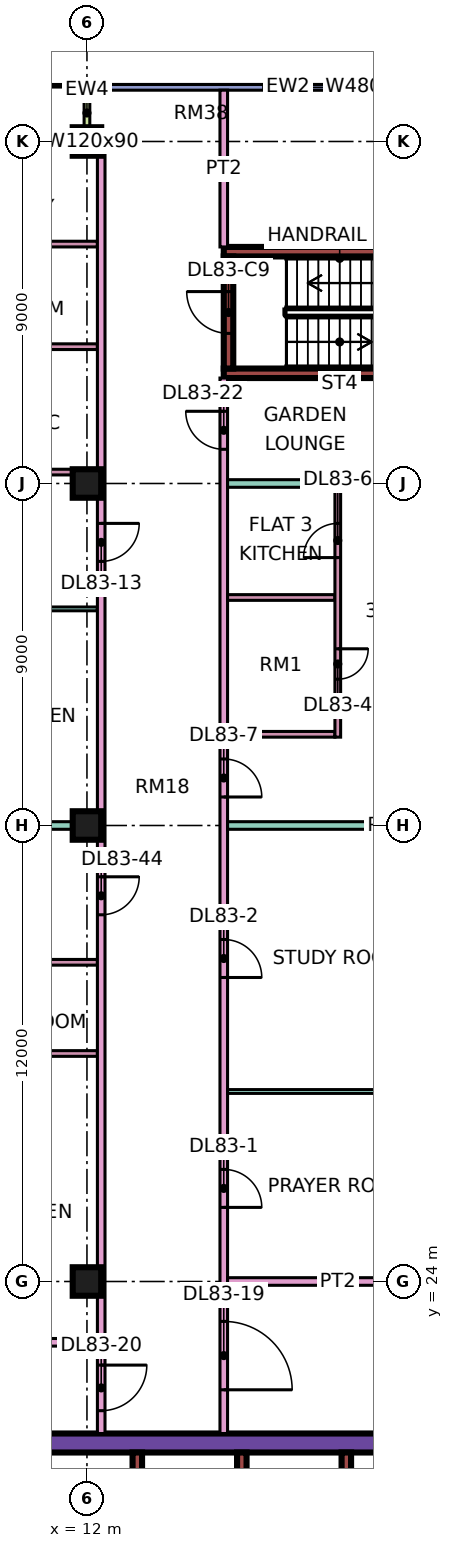
"""IFC4 building model, lengths in metres.
Left out: names, types, materials, properties, quantities, classifications, styles, units other than length and angle.
Written with IfcOpenShell. Run it as: python <this file> out.ifc"""

import sys

from ifc_helpers import new_model, si_unit, direction, frame, frame_2d, origin, origin_2d, place, context, subcontext, project, spatial, rectangle, extrude, element, fill, save


model = new_model("IFC4")
c1 = context("Model", 3, precision=1e-05, world=origin(), true_north=direction((0.0, 1.0)))
c2 = subcontext(c1, "Body", "Model", "MODEL_VIEW")
j1 = project(units=[si_unit("LENGTHUNIT", "METRE"), si_unit("PLANEANGLEUNIT", "RADIAN")], contexts=[c1])
p1 = place(None, origin())
s1 = spatial("IfcSite", under=j1, at=p1, CompositionType="ELEMENT")
p2 = place(p1, origin())
s2 = spatial("IfcBuilding", under=s1, at=p2, CompositionType="ELEMENT")
p3 = place(p2, frame((0.0, 0.0, 357.65)))
s3 = spatial("IfcBuildingStorey", under=s2, at=p3, CompositionType="ELEMENT", Elevation=357.65)
for number, where, z_axis, x_axis in (
    (1, (12.0, 24.0, 0.0), (0.0, 0.0, 1.0), (1.0, 0.0, 0.0)),
    (2, (12.0, 36.0, 0.0), (0.0, 0.0, 1.0), (1.0, 0.0, 0.0)),
    (3, (12.0, 45.0, 0.0), (0.0, 0.0, 1.0), (1.0, 0.0, 0.0)),
    (4, (12.0, 54.0, 0.0), (0.0, 0.0, 1.0), (1.0, 0.0, 0.0)),
):
    element("IfcColumn", number, at=place(p3, frame(where, z_axis=z_axis, x_axis=x_axis)), inside=s3, PredefinedType="COLUMN", context=c2, shape_type="SweptSolid", body=[
        extrude(rectangle(XDim=0.75, YDim=0.75, at=origin_2d()), origin(), (0.0, 0.0, 1.0), 3.75),
    ])
p4 = place(p3, frame((9.0, 19.75, 0.0), z_axis=(0.0, 0.0, 1.0), x_axis=(1.0, 0.0, 0.0)))
e5 = element("IfcWall", 5, at=p4, inside=s3, PredefinedType="SHEAR", context=c2, shape_type="SweptSolid", body=[
    extrude(rectangle(XDim=25.0, YDim=0.5, at=frame_2d((12.5, 0.0))), origin(), (0.0, 0.0, 1.0), 3.75),
])
p5 = place(p4, frame((19.1, 0.0, 0.0)))
e6 = element("IfcOpeningElement", 6, at=p5, cuts=e5, PredefinedType="OPENING", context=c2, shape_type="SweptSolid", body=[
    extrude(rectangle(XDim=1.8, YDim=2.4, at=frame_2d((0.9, 1.2))), frame((0.0, 0.26, 0.0), z_axis=(0.0, -1.0, 0.0), x_axis=(1.0, 0.0, 0.0)), (0.0, 0.0, 1.0), 0.52),
])
p6 = place(p3, frame((13.325, 7.5, 0.0), z_axis=(0.0, 0.0, 1.0), x_axis=(0.0, 1.0, 0.0)))
e7 = element("IfcWall", 7, at=p6, inside=s3, PredefinedType="SHEAR", context=c2, shape_type="SweptSolid", body=[
    extrude(rectangle(XDim=12.0, YDim=0.25, at=frame_2d((6.0, 0.0))), origin(), (0.0, 0.0, 1.0), 3.75),
])
for number, where, z_axis, x_axis in (
    (8, (16.075, 15.8, 0.0), (0.0, 0.0, 1.0), (0.0, 1.0, 0.0)),
    (9, (18.825, 15.8, 0.0), (0.0, 0.0, 1.0), (0.0, 1.0, 0.0)),
):
    element("IfcWall", number, at=place(p3, frame(where, z_axis=z_axis, x_axis=x_axis)), inside=s3, PredefinedType="SHEAR", context=c2, shape_type="SweptSolid", body=[
        extrude(rectangle(XDim=3.7, YDim=0.25, at=frame_2d((1.85, 0.0))), origin(), (0.0, 0.0, 1.0), 3.75),
    ])
for number, where, z_axis, x_axis in (
    (10, (15.6, 47.9, 0.0), (0.0, 0.0, 1.0), (1.0, 0.0, 0.0)),
    (11, (15.6, 51.1, 0.0), (0.0, 0.0, 1.0), (1.0, 0.0, 0.0)),
):
    element("IfcWall", number, at=place(p3, frame(where, z_axis=z_axis, x_axis=x_axis)), inside=s3, PredefinedType="SHEAR", context=c2, shape_type="SweptSolid", body=[
        extrude(rectangle(XDim=7.0, YDim=0.25, at=frame_2d((3.5, 0.0))), origin(), (0.0, 0.0, 1.0), 3.75),
    ])
p7 = place(p3, frame((15.725, 48.025, 0.0), z_axis=(0.0, 0.0, 1.0), x_axis=(0.0, 1.0, 0.0)))
e12 = element("IfcWall", 12, at=p7, inside=s3, PredefinedType="SHEAR", context=c2, shape_type="SweptSolid", body=[
    extrude(rectangle(XDim=2.95, YDim=0.25, at=frame_2d((1.475, 0.0))), origin(), (0.0, 0.0, 1.0), 3.75),
])
p8 = place(p7, frame((0.925, 0.0, 0.0)))
e13 = element("IfcOpeningElement", 13, at=p8, cuts=e12, PredefinedType="OPENING", context=c2, shape_type="SweptSolid", body=[
    extrude(rectangle(XDim=1.1, YDim=2.2, at=frame_2d((0.55, 1.1))), frame((0.0, 0.135, 0.0), z_axis=(0.0, -1.0, 0.0), x_axis=(1.0, 0.0, 0.0)), (0.0, 0.0, 1.0), 0.27),
])
p9 = place(p3, frame((22.5, 55.425, 0.0), z_axis=(0.0, 0.0, 1.0), x_axis=(-1.0, 0.0, 0.0)))
e14 = element("IfcWall", 14, at=p9, inside=s3, PredefinedType="SOLIDWALL", context=c2, shape_type="SweptSolid", body=[
    extrude(rectangle(XDim=10.425, YDim=0.15, at=frame_2d((5.212, 0.0))), origin(), (0.0, 0.0, 1.0), 3.35),
])
p10 = place(p9, frame((1.05, 0.0, 0.45)))
e15 = element("IfcOpeningElement", 15, at=p10, cuts=e14, PredefinedType="OPENING", context=c2, shape_type="SweptSolid", body=[
    extrude(rectangle(XDim=4.8, YDim=2.4, at=frame_2d((2.4, 1.2))), frame((0.0, 0.085, 0.0), z_axis=(0.0, -1.0, 0.0), x_axis=(1.0, 0.0, 0.0)), (0.0, 0.0, 1.0), 0.17),
])
p11 = place(p3, frame((11.925, 54.0, 0.0), z_axis=(0.0, 0.0, 1.0), x_axis=(-1.0, 0.0, 0.0)))
e16 = element("IfcWall", 16, at=p11, inside=s3, PredefinedType="SOLIDWALL", context=c2, shape_type="SweptSolid", body=[
    extrude(rectangle(XDim=10.35, YDim=0.15, at=frame_2d((5.175, 0.0))), origin(), (0.0, 0.0, 1.0), 3.35),
])
p12 = place(p11, frame((2.075, 0.0, 1.7)))
e17 = element("IfcOpeningElement", 17, at=p12, cuts=e16, PredefinedType="OPENING", context=c2, shape_type="SweptSolid", body=[
    extrude(rectangle(XDim=1.2, YDim=0.9, at=frame_2d((0.6, 0.45))), frame((0.0, 0.085, 0.0), z_axis=(0.0, -1.0, 0.0), x_axis=(1.0, 0.0, 0.0)), (0.0, 0.0, 1.0), 0.17),
])
p13 = place(p11, frame((7.35, 0.0, 0.0)))
e18 = element("IfcOpeningElement", 18, at=p13, cuts=e16, PredefinedType="OPENING", context=c2, shape_type="SweptSolid", body=[
    extrude(rectangle(XDim=1.8, YDim=2.4, at=frame_2d((0.9, 1.2))), frame((0.0, 0.085, 0.0), z_axis=(0.0, -1.0, 0.0), x_axis=(1.0, 0.0, 0.0)), (0.0, 0.0, 1.0), 0.17),
])
p14 = place(p3, frame((12.0, 55.5, 0.0), z_axis=(0.0, 0.0, 1.0), x_axis=(0.0, -1.0, 0.0)))
e19 = element("IfcWall", 19, at=p14, inside=s3, PredefinedType="SOLIDWALL", context=c2, shape_type="SweptSolid", body=[
    extrude(rectangle(XDim=1.5, YDim=0.15, at=frame_2d((0.75, 0.0))), origin(), (0.0, 0.0, 1.0), 3.35),
])
p15 = place(p3, frame((-1.35, 22.4, 0.0), z_axis=(0.0, 0.0, 1.0), x_axis=(1.0, 0.0, 0.0)))
e20 = element("IfcWall", 20, at=p15, inside=s3, PredefinedType="PARTITIONING", context=c2, shape_type="SweptSolid", body=[
    extrude(rectangle(XDim=13.625, YDim=0.2, at=frame_2d((6.812, 0.0))), origin(), (0.0, 0.0, 1.0), 3.35),
])
p16 = place(p3, frame((0.0, 36.0, 0.0), z_axis=(0.0, 0.0, 1.0), x_axis=(1.0, 0.0, 0.0)))
e21 = element("IfcWall", 21, at=p16, inside=s3, PredefinedType="PARTITIONING", context=c2, shape_type="SweptSolid", body=[
    extrude(rectangle(XDim=12.275, YDim=0.2, at=frame_2d((6.137, 0.0))), origin(), (0.0, 0.0, 1.0), 3.35),
])
p17 = place(p3, frame((7.025, 41.7, 0.0), z_axis=(0.0, 0.0, 1.0), x_axis=(1.0, 0.0, 0.0)))
e22 = element("IfcWall", 22, at=p17, inside=s3, PredefinedType="PARTITIONING", context=c2, shape_type="SweptSolid", body=[
    extrude(rectangle(XDim=5.25, YDim=0.1, at=frame_2d((2.625, 0.0))), origin(), (0.0, 0.0, 1.0), 3.35),
])
p18 = place(p17, frame((2.2, 0.0, 0.0)))
e23 = element("IfcOpeningElement", 23, at=p18, cuts=e22, PredefinedType="OPENING", context=c2, shape_type="SweptSolid", body=[
    extrude(rectangle(XDim=0.9, YDim=2.1, at=frame_2d((0.45, 1.05))), frame((0.0, 0.06, 0.0), z_axis=(0.0, -1.0, 0.0), x_axis=(1.0, 0.0, 0.0)), (0.0, 0.0, 1.0), 0.12),
])
p19 = place(p3, frame((7.05, 45.3, 0.0), z_axis=(0.0, 0.0, 1.0), x_axis=(1.0, 0.0, 0.0)))
e24 = element("IfcWall", 24, at=p19, inside=s3, PredefinedType="PARTITIONING", context=c2, shape_type="SweptSolid", body=[
    extrude(rectangle(XDim=5.225, YDim=0.15, at=frame_2d((2.612, 0.0))), origin(), (0.0, 0.0, 1.0), 3.35),
])
p20 = place(p19, frame((2.275, 0.0, 0.0)))
e25 = element("IfcOpeningElement", 25, at=p20, cuts=e24, PredefinedType="OPENING", context=c2, shape_type="SweptSolid", body=[
    extrude(rectangle(XDim=0.8, YDim=2.1, at=frame_2d((0.4, 1.05))), frame((0.0, 0.085, 0.0), z_axis=(0.0, -1.0, 0.0), x_axis=(1.0, 0.0, 0.0)), (0.0, 0.0, 1.0), 0.17),
])
for number, where, z_axis, x_axis in (
    (26, (7.05, 48.6, 0.0), (0.0, 0.0, 1.0), (1.0, 0.0, 0.0)),
    (27, (7.05, 51.3, 0.0), (0.0, 0.0, 1.0), (1.0, 0.0, 0.0)),
):
    element("IfcWall", number, at=place(p3, frame(where, z_axis=z_axis, x_axis=x_axis)), inside=s3, PredefinedType="PARTITIONING", context=c2, shape_type="SweptSolid", body=[
        extrude(rectangle(XDim=5.225, YDim=0.15, at=frame_2d((2.612, 0.0))), origin(), (0.0, 0.0, 1.0), 3.35),
    ])
for number, where, z_axis, x_axis in (
    (28, (8.25, 30.0, 0.0), (0.0, 0.0, 1.0), (1.0, 0.0, 0.0)),
    (29, (8.25, 32.4, 0.0), (0.0, 0.0, 1.0), (1.0, 0.0, 0.0)),
):
    element("IfcWall", number, at=place(p3, frame(where, z_axis=z_axis, x_axis=x_axis)), inside=s3, PredefinedType="PARTITIONING", context=c2, shape_type="SweptSolid", body=[
        extrude(rectangle(XDim=4.025, YDim=0.15, at=frame_2d((2.012, 0.0))), origin(), (0.0, 0.0, 1.0), 3.35),
    ])
p21 = place(p3, frame((12.375, 20.0, 0.0), z_axis=(0.0, 0.0, 1.0), x_axis=(0.0, 1.0, 0.0)))
e30 = element("IfcWall", 30, at=p21, inside=s3, PredefinedType="PARTITIONING", context=c2, shape_type="SweptSolid", body=[
    extrude(rectangle(XDim=34.0, YDim=0.2, at=frame_2d((17.0, 0.0))), origin(), (0.0, 0.0, 1.0), 3.35),
])
p22 = place(p21, frame((22.95, 0.0, 0.0)))
e31 = element("IfcOpeningElement", 31, at=p22, cuts=e30, PredefinedType="OPENING", context=c2, shape_type="SweptSolid", body=[
    extrude(rectangle(XDim=1.0, YDim=2.1, at=frame_2d((0.5, 1.05))), frame((0.0, 0.11, 0.0), z_axis=(0.0, -1.0, 0.0), x_axis=(1.0, 0.0, 0.0)), (0.0, 0.0, 1.0), 0.22),
])
p23 = place(p21, frame((0.6, 0.0, 0.0)))
e32 = element("IfcOpeningElement", 32, at=p23, cuts=e30, PredefinedType="OPENING", context=c2, shape_type="SweptSolid", body=[
    extrude(rectangle(XDim=1.2, YDim=2.1, at=frame_2d((0.6, 1.05))), frame((0.0, 0.11, 0.0), z_axis=(0.0, -1.0, 0.0), x_axis=(1.0, 0.0, 0.0)), (0.0, 0.0, 1.0), 0.22),
])
p24 = place(p21, frame((13.65, 0.0, 0.0)))
e33 = element("IfcOpeningElement", 33, at=p24, cuts=e30, PredefinedType="OPENING", context=c2, shape_type="SweptSolid", body=[
    extrude(rectangle(XDim=1.0, YDim=2.1, at=frame_2d((0.5, 1.05))), frame((0.0, 0.11, 0.0), z_axis=(0.0, -1.0, 0.0), x_axis=(1.0, 0.0, 0.0)), (0.0, 0.0, 1.0), 0.22),
])
p25 = place(p3, frame((15.6, 20.0, 0.0), z_axis=(0.0, 0.0, 1.0), x_axis=(0.0, 1.0, 0.0)))
e34 = element("IfcWall", 34, at=p25, inside=s3, PredefinedType="PARTITIONING", context=c2, shape_type="SweptSolid", body=[
    extrude(rectangle(XDim=27.775, YDim=0.2, at=frame_2d((13.887, 0.0))), origin(), (0.0, 0.0, 1.0), 3.35),
])
p26 = place(p25, frame((5.95, 0.0, 0.0)))
e35 = element("IfcOpeningElement", 35, at=p26, cuts=e34, PredefinedType="OPENING", context=c2, shape_type="SweptSolid", body=[
    extrude(rectangle(XDim=1.0, YDim=2.1, at=frame_2d((0.5, 1.05))), frame((0.0, 0.11, 0.0), z_axis=(0.0, -1.0, 0.0), x_axis=(1.0, 0.0, 0.0)), (0.0, 0.0, 1.0), 0.22),
])
p27 = place(p25, frame((12.0, 0.0, 0.0)))
e36 = element("IfcOpeningElement", 36, at=p27, cuts=e34, PredefinedType="OPENING", context=c2, shape_type="SweptSolid", body=[
    extrude(rectangle(XDim=1.0, YDim=2.1, at=frame_2d((0.5, 1.05))), frame((0.0, 0.11, 0.0), z_axis=(0.0, -1.0, 0.0), x_axis=(1.0, 0.0, 0.0)), (0.0, 0.0, 1.0), 0.22),
])
p28 = place(p25, frame((16.75, 0.0, 0.0)))
e37 = element("IfcOpeningElement", 37, at=p28, cuts=e34, PredefinedType="OPENING", context=c2, shape_type="SweptSolid", body=[
    extrude(rectangle(XDim=1.0, YDim=2.1, at=frame_2d((0.5, 1.05))), frame((0.0, 0.11, 0.0), z_axis=(0.0, -1.0, 0.0), x_axis=(1.0, 0.0, 0.0)), (0.0, 0.0, 1.0), 0.22),
])
p29 = place(p25, frame((1.15, 0.0, 0.0)))
e38 = element("IfcOpeningElement", 38, at=p29, cuts=e34, PredefinedType="OPENING", context=c2, shape_type="SweptSolid", body=[
    extrude(rectangle(XDim=1.8, YDim=2.1, at=frame_2d((0.9, 1.05))), frame((0.0, 0.11, 0.0), z_axis=(0.0, -1.0, 0.0), x_axis=(1.0, 0.0, 0.0)), (0.0, 0.0, 1.0), 0.22),
])
p30 = place(p25, frame((25.9, 0.0, 0.0)))
e39 = element("IfcOpeningElement", 39, at=p30, cuts=e34, PredefinedType="OPENING", context=c2, shape_type="SweptSolid", body=[
    extrude(rectangle(XDim=1.0, YDim=2.1, at=frame_2d((0.5, 1.05))), frame((0.0, 0.11, 0.0), z_axis=(0.0, -1.0, 0.0), x_axis=(1.0, 0.0, 0.0)), (0.0, 0.0, 1.0), 0.22),
])
p31 = place(p3, frame((15.6, 51.225, 0.0), z_axis=(0.0, 0.0, 1.0), x_axis=(0.0, 1.0, 0.0)))
e40 = element("IfcWall", 40, at=p31, inside=s3, PredefinedType="PARTITIONING", context=c2, shape_type="SweptSolid", body=[
    extrude(rectangle(XDim=4.125, YDim=0.2, at=frame_2d((2.062, 0.0))), origin(), (0.0, 0.0, 1.0), 3.35),
])
p32 = place(p3, frame((15.7, 24.0, 0.0), z_axis=(0.0, 0.0, 1.0), x_axis=(1.0, 0.0, 0.0)))
e41 = element("IfcWall", 41, at=p32, inside=s3, PredefinedType="PARTITIONING", context=c2, shape_type="SweptSolid", body=[
    extrude(rectangle(XDim=5.8, YDim=0.2, at=frame_2d((2.9, 0.0))), origin(), (0.0, 0.0, 1.0), 3.35),
])
p33 = place(p3, frame((15.7, 29.0, 0.0), z_axis=(0.0, 0.0, 1.0), x_axis=(1.0, 0.0, 0.0)))
e42 = element("IfcWall", 42, at=p33, inside=s3, PredefinedType="PARTITIONING", context=c2, shape_type="SweptSolid", body=[
    extrude(rectangle(XDim=5.8, YDim=0.1, at=frame_2d((2.9, 0.0))), origin(), (0.0, 0.0, 1.0), 3.35),
])
p34 = place(p3, frame((15.7, 36.0, 0.0), z_axis=(0.0, 0.0, 1.0), x_axis=(1.0, 0.0, 0.0)))
e43 = element("IfcWall", 43, at=p34, inside=s3, PredefinedType="PARTITIONING", context=c2, shape_type="SweptSolid", body=[
    extrude(rectangle(XDim=8.3, YDim=0.2, at=frame_2d((4.15, 0.0))), origin(), (0.0, 0.0, 1.0), 3.35),
])
for number, where, z_axis, x_axis in (
    (44, (15.7, 38.4, 0.0), (0.0, 0.0, 1.0), (1.0, 0.0, 0.0)),
    (45, (15.7, 42.0, 0.0), (0.0, 0.0, 1.0), (1.0, 0.0, 0.0)),
):
    element("IfcWall", number, at=place(p3, frame(where, z_axis=z_axis, x_axis=x_axis)), inside=s3, PredefinedType="PARTITIONING", context=c2, shape_type="SweptSolid", body=[
        extrude(rectangle(XDim=2.825, YDim=0.15, at=frame_2d((1.413, 0.0))), origin(), (0.0, 0.0, 1.0), 3.35),
    ])
p35 = place(p3, frame((15.7, 45.0, 0.0), z_axis=(0.0, 0.0, 1.0), x_axis=(1.0, 0.0, 0.0)))
e46 = element("IfcWall", 46, at=p35, inside=s3, PredefinedType="PARTITIONING", context=c2, shape_type="SweptSolid", body=[
    extrude(rectangle(XDim=8.3, YDim=0.2, at=frame_2d((4.15, 0.0))), origin(), (0.0, 0.0, 1.0), 3.35),
])
p36 = place(p3, frame((18.6, 38.325, 0.0), z_axis=(0.0, 0.0, 1.0), x_axis=(0.0, 1.0, 0.0)))
e47 = element("IfcWall", 47, at=p36, inside=s3, PredefinedType="PARTITIONING", context=c2, shape_type="SweptSolid", body=[
    extrude(rectangle(XDim=6.575, YDim=0.15, at=frame_2d((3.288, 0.0))), origin(), (0.0, 0.0, 1.0), 3.35),
])
p37 = place(p36, frame((1.525, 0.0, 0.0)))
e48 = element("IfcOpeningElement", 48, at=p37, cuts=e47, PredefinedType="OPENING", context=c2, shape_type="SweptSolid", body=[
    extrude(rectangle(XDim=0.8, YDim=2.1, at=frame_2d((0.4, 1.05))), frame((0.0, 0.085, 0.0), z_axis=(0.0, -1.0, 0.0), x_axis=(1.0, 0.0, 0.0)), (0.0, 0.0, 1.0), 0.17),
])
p38 = place(p36, frame((4.725, 0.0, 0.0)))
e49 = element("IfcOpeningElement", 49, at=p38, cuts=e47, PredefinedType="OPENING", context=c2, shape_type="SweptSolid", body=[
    extrude(rectangle(XDim=0.9, YDim=2.1, at=frame_2d((0.45, 1.05))), frame((0.0, 0.085, 0.0), z_axis=(0.0, -1.0, 0.0), x_axis=(1.0, 0.0, 0.0)), (0.0, 0.0, 1.0), 0.17),
])
p39 = place(p10, origin())
e50 = element("IfcWindow", 50, at=p39, inside=s3, PartitioningType="SINGLE_PANEL", PredefinedType="WINDOW", context=c2, shape_type="SweptSolid", body=[
    extrude(rectangle(XDim=4.8, YDim=2.4, at=frame_2d((2.4, 1.2))), frame((0.0, 0.03, 0.0), z_axis=(0.0, -1.0, 0.0), x_axis=(1.0, 0.0, 0.0)), (0.0, 0.0, 1.0), 0.06),
])
fill(e15, e50)
p40 = place(p8, frame((1.1, 0.0, 0.0), z_axis=(0.0, 0.0, 1.0), x_axis=(-1.0, 0.0, 0.0)))
e51 = element("IfcDoor", 51, at=p40, inside=s3, OperationType="SINGLE_SWING_RIGHT", PredefinedType="DOOR", context=c2, shape_type="SweptSolid", body=[
    extrude(rectangle(XDim=1.1, YDim=2.2, at=frame_2d((0.55, 1.1))), frame((0.0, 0.025, 0.0), z_axis=(0.0, -1.0, 0.0), x_axis=(1.0, 0.0, 0.0)), (0.0, 0.0, 1.0), 0.05),
])
fill(e13, e51)
p41 = place(p26, frame((1.0, 0.0, 0.0), z_axis=(0.0, 0.0, 1.0), x_axis=(-1.0, 0.0, 0.0)))
e52 = element("IfcDoor", 52, at=p41, inside=s3, OperationType="SINGLE_SWING_LEFT", PredefinedType="DOOR", context=c2, shape_type="SweptSolid", body=[
    extrude(rectangle(XDim=1.0, YDim=2.1, at=frame_2d((0.5, 1.05))), frame((0.0, 0.025, 0.0), z_axis=(0.0, -1.0, 0.0), x_axis=(1.0, 0.0, 0.0)), (0.0, 0.0, 1.0), 0.05),
])
fill(e35, e52)
p42 = place(p27, frame((1.0, 0.0, 0.0), z_axis=(0.0, 0.0, 1.0), x_axis=(-1.0, 0.0, 0.0)))
e53 = element("IfcDoor", 53, at=p42, inside=s3, OperationType="SINGLE_SWING_LEFT", PredefinedType="DOOR", context=c2, shape_type="SweptSolid", body=[
    extrude(rectangle(XDim=1.0, YDim=2.1, at=frame_2d((0.5, 1.05))), frame((0.0, 0.025, 0.0), z_axis=(0.0, -1.0, 0.0), x_axis=(1.0, 0.0, 0.0)), (0.0, 0.0, 1.0), 0.05),
])
fill(e36, e53)
p43 = place(p37, origin())
e54 = element("IfcDoor", 54, at=p43, inside=s3, OperationType="SINGLE_SWING_RIGHT", PredefinedType="DOOR", context=c2, shape_type="SweptSolid", body=[
    extrude(rectangle(XDim=0.8, YDim=2.1, at=frame_2d((0.4, 1.05))), frame((0.0, 0.025, 0.0), z_axis=(0.0, -1.0, 0.0), x_axis=(1.0, 0.0, 0.0)), (0.0, 0.0, 1.0), 0.05),
])
fill(e48, e54)
p44 = place(p38, origin())
e55 = element("IfcDoor", 55, at=p44, inside=s3, OperationType="SINGLE_SWING_LEFT", PredefinedType="DOOR", context=c2, shape_type="SweptSolid", body=[
    extrude(rectangle(XDim=0.9, YDim=2.1, at=frame_2d((0.45, 1.05))), frame((0.0, 0.025, 0.0), z_axis=(0.0, -1.0, 0.0), x_axis=(1.0, 0.0, 0.0)), (0.0, 0.0, 1.0), 0.05),
])
fill(e49, e55)
p45 = place(p28, frame((1.0, 0.0, 0.0), z_axis=(0.0, 0.0, 1.0), x_axis=(-1.0, 0.0, 0.0)))
e56 = element("IfcDoor", 56, at=p45, inside=s3, OperationType="SINGLE_SWING_LEFT", PredefinedType="DOOR", context=c2, shape_type="SweptSolid", body=[
    extrude(rectangle(XDim=1.0, YDim=2.1, at=frame_2d((0.5, 1.05))), frame((0.0, 0.025, 0.0), z_axis=(0.0, -1.0, 0.0), x_axis=(1.0, 0.0, 0.0)), (0.0, 0.0, 1.0), 0.05),
])
fill(e37, e56)
p46 = place(p22, origin())
e57 = element("IfcDoor", 57, at=p46, inside=s3, OperationType="SINGLE_SWING_RIGHT", PredefinedType="DOOR", context=c2, shape_type="SweptSolid", body=[
    extrude(rectangle(XDim=1.0, YDim=2.1, at=frame_2d((0.5, 1.05))), frame((0.0, 0.025, 0.0), z_axis=(0.0, -1.0, 0.0), x_axis=(1.0, 0.0, 0.0)), (0.0, 0.0, 1.0), 0.05),
])
fill(e31, e57)
p47 = place(p29, frame((1.8, 0.0, 0.0), z_axis=(0.0, 0.0, 1.0), x_axis=(-1.0, 0.0, 0.0)))
e58 = element("IfcDoor", 58, at=p47, inside=s3, OperationType="DOUBLE_DOOR_SINGLE_SWING", PredefinedType="DOOR", context=c2, shape_type="SweptSolid", body=[
    extrude(rectangle(XDim=1.8, YDim=2.1, at=frame_2d((0.9, 1.05))), frame((0.0, 0.025, 0.0), z_axis=(0.0, -1.0, 0.0), x_axis=(1.0, 0.0, 0.0)), (0.0, 0.0, 1.0), 0.05),
])
fill(e38, e58)
p48 = place(p23, origin())
e59 = element("IfcDoor", 59, at=p48, inside=s3, OperationType="SINGLE_SWING_RIGHT", PredefinedType="DOOR", context=c2, shape_type="SweptSolid", body=[
    extrude(rectangle(XDim=1.2, YDim=2.1, at=frame_2d((0.6, 1.05))), frame((0.0, 0.025, 0.0), z_axis=(0.0, -1.0, 0.0), x_axis=(1.0, 0.0, 0.0)), (0.0, 0.0, 1.0), 0.05),
])
fill(e32, e59)
p49 = place(p30, frame((1.0, 0.0, 0.0), z_axis=(0.0, 0.0, 1.0), x_axis=(-1.0, 0.0, 0.0)))
e60 = element("IfcDoor", 60, at=p49, inside=s3, OperationType="SINGLE_SWING_RIGHT", PredefinedType="DOOR", context=c2, shape_type="SweptSolid", body=[
    extrude(rectangle(XDim=1.0, YDim=2.1, at=frame_2d((0.5, 1.05))), frame((0.0, 0.025, 0.0), z_axis=(0.0, -1.0, 0.0), x_axis=(1.0, 0.0, 0.0)), (0.0, 0.0, 1.0), 0.05),
])
fill(e39, e60)
p50 = place(p24, origin())
e61 = element("IfcDoor", 61, at=p50, inside=s3, OperationType="SINGLE_SWING_RIGHT", PredefinedType="DOOR", context=c2, shape_type="SweptSolid", body=[
    extrude(rectangle(XDim=1.0, YDim=2.1, at=frame_2d((0.5, 1.05))), frame((0.0, 0.025, 0.0), z_axis=(0.0, -1.0, 0.0), x_axis=(1.0, 0.0, 0.0)), (0.0, 0.0, 1.0), 0.05),
])
fill(e33, e61)
save(model, sys.argv[1])
